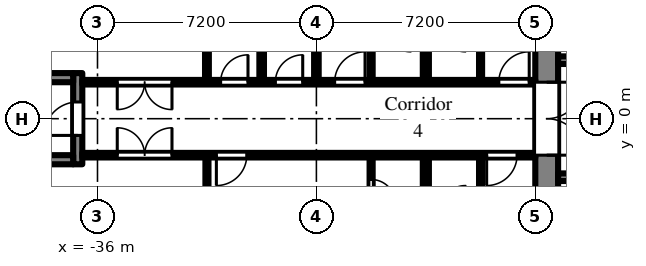
"""IFC4 building model, lengths in metres.
Left out: names, types, materials, properties, quantities, classifications, styles, units other than length and angle.
Written with IfcOpenShell. Run it as: python <this file> out.ifc"""

import sys

from ifc_helpers import new_model, si_unit, direction, frame, frame_2d, origin, place, context, subcontext, project, spatial, rectangle, extrude, element, fill, save


model = new_model("IFC4")
c1 = context("Model", 3, precision=1e-05, world=origin(), true_north=direction((0.0, 1.0)))
c2 = subcontext(c1, "Body", "Model", "MODEL_VIEW")
j1 = project(units=[si_unit("LENGTHUNIT", "METRE"), si_unit("PLANEANGLEUNIT", "RADIAN")], contexts=[c1])
p1 = place(None, origin())
s1 = spatial("IfcSite", under=j1, at=p1, CompositionType="ELEMENT")
p2 = place(p1, origin())
s2 = spatial("IfcBuilding", under=s1, at=p2, CompositionType="ELEMENT")
p3 = place(p2, frame((0.0, 0.0, 44.7)))
s3 = spatial("IfcBuildingStorey", under=s2, at=p3, CompositionType="ELEMENT", Elevation=44.7)
p4 = place(p3, frame((-21.225, -7.2, 0.0), z_axis=(0.0, 0.0, 1.0), x_axis=(0.0, 1.0, 0.0)))
e1 = element("IfcWall", 1, at=p4, inside=s3, PredefinedType="SHEAR", context=c2, shape_type="SweptSolid", body=[
    extrude(rectangle(XDim=14.4, YDim=0.75, at=frame_2d((7.2, 0.0))), origin(), (0.0, 0.0, 1.0), 2.575),
])
p5 = place(p4, frame((6.0, 0.0, 0.0)))
e2 = element("IfcOpeningElement", 2, at=p5, cuts=e1, PredefinedType="OPENING", context=c2, shape_type="SweptSolid", body=[
    extrude(rectangle(XDim=2.4, YDim=2.2, at=frame_2d((1.2, 1.1))), frame((0.0, 0.385, 0.0), z_axis=(0.0, -1.0, 0.0), x_axis=(1.0, 0.0, 0.0)), (0.0, 0.0, 1.0), 0.77),
])
p6 = place(p3, frame((-7.9, 1.925, 0.0), z_axis=(0.0, 0.0, 1.0), x_axis=(-1.0, 0.0, 0.0)))
e3 = element("IfcWall", 3, at=p6, inside=s3, PredefinedType="SHEAR", context=c2, shape_type="SweptSolid", body=[
    extrude(rectangle(XDim=12.95, YDim=0.25, at=frame_2d((6.475, 0.0))), origin(), (0.0, 0.0, 1.0), 2.575),
])
p7 = place(p6, frame((0.525, 0.0, 0.0)))
e4 = element("IfcOpeningElement", 4, at=p7, cuts=e3, PredefinedType="OPENING", context=c2, shape_type="SweptSolid", body=[
    extrude(rectangle(XDim=0.9, YDim=2.1, at=frame_2d((0.45, 1.05))), frame((0.0, 0.135, 0.0), z_axis=(0.0, -1.0, 0.0), x_axis=(1.0, 0.0, 0.0)), (0.0, 0.0, 1.0), 0.27),
])
p8 = place(p6, frame((2.625, 0.0, 0.0)))
e5 = element("IfcOpeningElement", 5, at=p8, cuts=e3, PredefinedType="OPENING", context=c2, shape_type="SweptSolid", body=[
    extrude(rectangle(XDim=1.1, YDim=2.1, at=frame_2d((0.55, 1.05))), frame((0.0, 0.135, 0.0), z_axis=(0.0, -1.0, 0.0), x_axis=(1.0, 0.0, 0.0)), (0.0, 0.0, 1.0), 0.27),
])
p9 = place(p6, frame((4.925, 0.0, 0.0)))
e6 = element("IfcOpeningElement", 6, at=p9, cuts=e3, PredefinedType="OPENING", context=c2, shape_type="SweptSolid", body=[
    extrude(rectangle(XDim=0.9, YDim=2.1, at=frame_2d((0.45, 1.05))), frame((0.0, 0.135, 0.0), z_axis=(0.0, -1.0, 0.0), x_axis=(1.0, 0.0, 0.0)), (0.0, 0.0, 1.0), 0.27),
])
p10 = place(p6, frame((8.225, 0.0, 0.0)))
e7 = element("IfcOpeningElement", 7, at=p10, cuts=e3, PredefinedType="OPENING", context=c2, shape_type="SweptSolid", body=[
    extrude(rectangle(XDim=0.9, YDim=2.1, at=frame_2d((0.45, 1.05))), frame((0.0, 0.135, 0.0), z_axis=(0.0, -1.0, 0.0), x_axis=(1.0, 0.0, 0.0)), (0.0, 0.0, 1.0), 0.27),
])
p11 = place(p3, frame((-7.9, -1.925, 0.0), z_axis=(0.0, 0.0, 1.0), x_axis=(-1.0, 0.0, 0.0)))
e8 = element("IfcWall", 8, at=p11, inside=s3, PredefinedType="SHEAR", context=c2, shape_type="SweptSolid", body=[
    extrude(rectangle(XDim=12.95, YDim=0.25, at=frame_2d((6.475, 0.0))), origin(), (0.0, 0.0, 1.0), 2.575),
])
p12 = place(p11, frame((4.825, 0.0, 0.0)))
e9 = element("IfcOpeningElement", 9, at=p12, cuts=e8, PredefinedType="OPENING", context=c2, shape_type="SweptSolid", body=[
    extrude(rectangle(XDim=1.1, YDim=2.1, at=frame_2d((0.55, 1.05))), frame((0.0, 0.135, 0.0), z_axis=(0.0, -1.0, 0.0), x_axis=(1.0, 0.0, 0.0)), (0.0, 0.0, 1.0), 0.27),
])
p13 = place(p11, frame((7.025, 0.0, 0.0)))
e10 = element("IfcOpeningElement", 10, at=p13, cuts=e8, PredefinedType="OPENING", context=c2, shape_type="SweptSolid", body=[
    extrude(rectangle(XDim=1.1, YDim=2.1, at=frame_2d((0.55, 1.05))), frame((0.0, 0.135, 0.0), z_axis=(0.0, -1.0, 0.0), x_axis=(1.0, 0.0, 0.0)), (0.0, 0.0, 1.0), 0.27),
])
p14 = place(p11, frame((9.225, 0.0, 0.0)))
e11 = element("IfcOpeningElement", 11, at=p14, cuts=e8, PredefinedType="OPENING", context=c2, shape_type="SweptSolid", body=[
    extrude(rectangle(XDim=1.1, YDim=2.1, at=frame_2d((0.55, 1.05))), frame((0.0, 0.135, 0.0), z_axis=(0.0, -1.0, 0.0), x_axis=(1.0, 0.0, 0.0)), (0.0, 0.0, 1.0), 0.27),
])
p15 = place(p11, frame((0.525, 0.0, 0.0)))
e12 = element("IfcOpeningElement", 12, at=p15, cuts=e8, PredefinedType="OPENING", context=c2, shape_type="SweptSolid", body=[
    extrude(rectangle(XDim=0.9, YDim=2.1, at=frame_2d((0.45, 1.05))), frame((0.0, 0.135, 0.0), z_axis=(0.0, -1.0, 0.0), x_axis=(1.0, 0.0, 0.0)), (0.0, 0.0, 1.0), 0.27),
])
p16 = place(p11, frame((2.625, 0.0, 0.0)))
e13 = element("IfcOpeningElement", 13, at=p16, cuts=e8, PredefinedType="OPENING", context=c2, shape_type="SweptSolid", body=[
    extrude(rectangle(XDim=1.1, YDim=2.1, at=frame_2d((0.55, 1.05))), frame((0.0, 0.135, 0.0), z_axis=(0.0, -1.0, 0.0), x_axis=(1.0, 0.0, 0.0)), (0.0, 0.0, 1.0), 0.27),
])
p17 = place(p3, frame((-36.65, -1.5, 0.0), z_axis=(0.0, 0.0, 1.0), x_axis=(0.0, 1.0, 0.0)))
e14 = element("IfcWall", 14, at=p17, inside=s3, PredefinedType="SHEAR", context=c2, shape_type="SweptSolid", body=[
    extrude(rectangle(XDim=3.0, YDim=0.3, at=frame_2d((1.5, 0.0))), origin(), (0.0, 0.0, 1.0), 2.575),
])
p18 = place(p17, frame((0.95, 0.0, 0.0)))
e15 = element("IfcOpeningElement", 15, at=p18, cuts=e14, PredefinedType="OPENING", context=c2, shape_type="SweptSolid", body=[
    extrude(rectangle(XDim=1.1, YDim=2.1, at=frame_2d((0.55, 1.05))), frame((0.0, 0.16, 0.0), z_axis=(0.0, -1.0, 0.0), x_axis=(1.0, 0.0, 0.0)), (0.0, 0.0, 1.0), 0.32),
])
for number, where, z_axis, x_axis in (
    (16, (-36.8, -1.35, 0.0), (0.0, 0.0, 1.0), (-1.0, 0.0, 0.0)),
    (17, (-36.8, 1.35, 0.0), (0.0, 0.0, 1.0), (-1.0, 0.0, 0.0)),
):
    element("IfcWall", number, at=place(p3, frame(where, z_axis=z_axis, x_axis=x_axis)), inside=s3, PredefinedType="SHEAR", context=c2, shape_type="SweptSolid", body=[
        extrude(rectangle(XDim=5.8, YDim=0.3, at=frame_2d((2.9, 0.0))), origin(), (0.0, 0.0, 1.0), 2.575),
    ])
p19 = place(p3, frame((-36.5, -1.2, 0.0), z_axis=(0.0, 0.0, 1.0), x_axis=(1.0, 0.0, 0.0)))
e18 = element("IfcWall", 18, at=p19, inside=s3, PredefinedType="PARTITIONING", context=c2, shape_type="SweptSolid", body=[
    extrude(rectangle(XDim=14.9, YDim=0.15, at=frame_2d((7.45, 0.0))), origin(), (0.0, 0.0, 1.0), 2.575),
])
p20 = place(p19, frame((13.3, 0.0, 0.0)))
e19 = element("IfcOpeningElement", 19, at=p20, cuts=e18, PredefinedType="OPENING", context=c2, shape_type="SweptSolid", body=[
    extrude(rectangle(XDim=1.0, YDim=2.1, at=frame_2d((0.5, 1.05))), frame((0.0, 0.085, 0.0), z_axis=(0.0, -1.0, 0.0), x_axis=(1.0, 0.0, 0.0)), (0.0, 0.0, 1.0), 0.17),
])
p21 = place(p19, frame((4.41, 0.0, 0.0)))
e20 = element("IfcOpeningElement", 20, at=p21, cuts=e18, PredefinedType="OPENING", context=c2, shape_type="SweptSolid", body=[
    extrude(rectangle(XDim=1.0, YDim=2.1, at=frame_2d((0.5, 1.05))), frame((0.0, 0.085, 0.0), z_axis=(0.0, -1.0, 0.0), x_axis=(1.0, 0.0, 0.0)), (0.0, 0.0, 1.0), 0.17),
])
p22 = place(p19, frame((1.15, 0.0, 0.0)))
e21 = element("IfcOpeningElement", 21, at=p22, cuts=e18, PredefinedType="OPENING", context=c2, shape_type="SweptSolid", body=[
    extrude(rectangle(XDim=1.8, YDim=2.1, at=frame_2d((0.9, 1.05))), frame((0.0, 0.085, 0.0), z_axis=(0.0, -1.0, 0.0), x_axis=(1.0, 0.0, 0.0)), (0.0, 0.0, 1.0), 0.17),
])
p23 = place(p3, frame((-36.5, 1.2, 0.0), z_axis=(0.0, 0.0, 1.0), x_axis=(1.0, 0.0, 0.0)))
e22 = element("IfcWall", 22, at=p23, inside=s3, PredefinedType="PARTITIONING", context=c2, shape_type="SweptSolid", body=[
    extrude(rectangle(XDim=14.9, YDim=0.15, at=frame_2d((7.45, 0.0))), origin(), (0.0, 0.0, 1.0), 2.575),
])
p24 = place(p23, frame((13.7, 0.0, 0.0)))
e23 = element("IfcOpeningElement", 23, at=p24, cuts=e22, PredefinedType="OPENING", context=c2, shape_type="SweptSolid", body=[
    extrude(rectangle(XDim=1.0, YDim=2.1, at=frame_2d((0.5, 1.05))), frame((0.0, 0.085, 0.0), z_axis=(0.0, -1.0, 0.0), x_axis=(1.0, 0.0, 0.0)), (0.0, 0.0, 1.0), 0.17),
])
p25 = place(p23, frame((8.3, 0.0, 0.0)))
e24 = element("IfcOpeningElement", 24, at=p25, cuts=e22, PredefinedType="OPENING", context=c2, shape_type="SweptSolid", body=[
    extrude(rectangle(XDim=1.0, YDim=2.1, at=frame_2d((0.5, 1.05))), frame((0.0, 0.085, 0.0), z_axis=(0.0, -1.0, 0.0), x_axis=(1.0, 0.0, 0.0)), (0.0, 0.0, 1.0), 0.17),
])
p26 = place(p23, frame((6.35, 0.0, 0.0)))
e25 = element("IfcOpeningElement", 25, at=p26, cuts=e22, PredefinedType="OPENING", context=c2, shape_type="SweptSolid", body=[
    extrude(rectangle(XDim=0.9, YDim=2.1, at=frame_2d((0.45, 1.05))), frame((0.0, 0.085, 0.0), z_axis=(0.0, -1.0, 0.0), x_axis=(1.0, 0.0, 0.0)), (0.0, 0.0, 1.0), 0.17),
])
p27 = place(p23, frame((4.55, 0.0, 0.0)))
e26 = element("IfcOpeningElement", 26, at=p27, cuts=e22, PredefinedType="OPENING", context=c2, shape_type="SweptSolid", body=[
    extrude(rectangle(XDim=0.9, YDim=2.1, at=frame_2d((0.45, 1.05))), frame((0.0, 0.085, 0.0), z_axis=(0.0, -1.0, 0.0), x_axis=(1.0, 0.0, 0.0)), (0.0, 0.0, 1.0), 0.17),
])
p28 = place(p23, frame((1.15, 0.0, 0.0)))
e27 = element("IfcOpeningElement", 27, at=p28, cuts=e22, PredefinedType="OPENING", context=c2, shape_type="SweptSolid", body=[
    extrude(rectangle(XDim=1.8, YDim=2.1, at=frame_2d((0.9, 1.05))), frame((0.0, 0.085, 0.0), z_axis=(0.0, -1.0, 0.0), x_axis=(1.0, 0.0, 0.0)), (0.0, 0.0, 1.0), 0.17),
])
p29 = place(p3, frame((-32.4, -6.9, 0.0), z_axis=(0.0, 0.0, 1.0), x_axis=(0.0, 1.0, 0.0)))
e28 = element("IfcWall", 28, at=p29, inside=s3, PredefinedType="PARTITIONING", context=c2, shape_type="SweptSolid", body=[
    extrude(rectangle(XDim=5.625, YDim=0.1, at=frame_2d((2.812, 0.0))), origin(), (0.0, 0.0, 1.0), 2.575),
])
p30 = place(p3, frame((-32.4, 1.275, 0.0), z_axis=(0.0, 0.0, 1.0), x_axis=(0.0, 1.0, 0.0)))
e29 = element("IfcWall", 29, at=p30, inside=s3, PredefinedType="PARTITIONING", context=c2, shape_type="SweptSolid", body=[
    extrude(rectangle(XDim=5.625, YDim=0.125, at=frame_2d((2.812, 0.0))), origin(), (0.0, 0.0, 1.0), 2.575),
])
for number, where, z_axis, x_axis in (
    (30, (-30.6, 1.275, 0.0), (0.0, 0.0, 1.0), (0.0, 1.0, 0.0)),
    (31, (-28.8, 1.275, 0.0), (0.0, 0.0, 1.0), (0.0, 1.0, 0.0)),
):
    element("IfcWall", number, at=place(p3, frame(where, z_axis=z_axis, x_axis=x_axis)), inside=s3, PredefinedType="PARTITIONING", context=c2, shape_type="SweptSolid", body=[
        extrude(rectangle(XDim=5.625, YDim=0.15, at=frame_2d((2.812, 0.0))), origin(), (0.0, 0.0, 1.0), 2.575),
    ])
p31 = place(p3, frame((-27.0, -3.65, 0.0), z_axis=(0.0, 0.0, 1.0), x_axis=(0.0, 1.0, 0.0)))
e32 = element("IfcWall", 32, at=p31, inside=s3, PredefinedType="PARTITIONING", context=c2, shape_type="SweptSolid", body=[
    extrude(rectangle(XDim=2.375, YDim=0.1, at=frame_2d((1.188, 0.0))), origin(), (0.0, 0.0, 1.0), 2.575),
])
p32 = place(p31, frame((0.85, 0.0, 0.0)))
e33 = element("IfcOpeningElement", 33, at=p32, cuts=e32, PredefinedType="OPENING", context=c2, shape_type="SweptSolid", body=[
    extrude(rectangle(XDim=0.8, YDim=2.1, at=frame_2d((0.4, 1.05))), frame((0.0, 0.06, 0.0), z_axis=(0.0, -1.0, 0.0), x_axis=(1.0, 0.0, 0.0)), (0.0, 0.0, 1.0), 0.12),
])
p33 = place(p3, frame((-27.0, 1.275, 0.0), z_axis=(0.0, 0.0, 1.0), x_axis=(0.0, 1.0, 0.0)))
e34 = element("IfcWall", 34, at=p33, inside=s3, PredefinedType="PARTITIONING", context=c2, shape_type="SweptSolid", body=[
    extrude(rectangle(XDim=1.675, YDim=0.1, at=frame_2d((0.837, 0.0))), origin(), (0.0, 0.0, 1.0), 2.575),
])
for number, where, z_axis, x_axis in (
    (35, (-25.2, -6.9, 0.0), (0.0, 0.0, 1.0), (0.0, 1.0, 0.0)),
    (36, (-25.2, 1.275, 0.0), (0.0, 0.0, 1.0), (0.0, 1.0, 0.0)),
):
    element("IfcWall", number, at=place(p3, frame(where, z_axis=z_axis, x_axis=x_axis)), inside=s3, PredefinedType="PARTITIONING", context=c2, shape_type="SweptSolid", body=[
        extrude(rectangle(XDim=5.625, YDim=0.2, at=frame_2d((2.812, 0.0))), origin(), (0.0, 0.0, 1.0), 2.575),
    ])
for number, where, z_axis, x_axis in (
    (37, (-23.4, -2.95, 0.0), (0.0, 0.0, 1.0), (0.0, 1.0, 0.0)),
    (38, (-23.4, 1.275, 0.0), (0.0, 0.0, 1.0), (0.0, 1.0, 0.0)),
):
    element("IfcWall", number, at=place(p3, frame(where, z_axis=z_axis, x_axis=x_axis)), inside=s3, PredefinedType="PARTITIONING", context=c2, shape_type="SweptSolid", body=[
        extrude(rectangle(XDim=1.675, YDim=0.1, at=frame_2d((0.837, 0.0))), origin(), (0.0, 0.0, 1.0), 2.575),
    ])
p34 = place(p5, frame((2.4, 0.0, 0.0), z_axis=(0.0, 0.0, 1.0), x_axis=(-1.0, 0.0, 0.0)))
e39 = element("IfcDoor", 39, at=p34, inside=s3, OperationType="DOUBLE_DOOR_DOUBLE_SWING", PredefinedType="DOOR", context=c2, shape_type="SweptSolid", body=[
    extrude(rectangle(XDim=2.4, YDim=2.2, at=frame_2d((1.2, 1.1))), frame((0.0, 0.025, 0.0), z_axis=(0.0, -1.0, 0.0), x_axis=(1.0, 0.0, 0.0)), (0.0, 0.0, 1.0), 0.05),
])
fill(e2, e39)
p35 = place(p18, origin())
e40 = element("IfcDoor", 40, at=p35, inside=s3, OperationType="SINGLE_SWING_LEFT", PredefinedType="DOOR", context=c2, shape_type="SweptSolid", body=[
    extrude(rectangle(XDim=1.1, YDim=2.1, at=frame_2d((0.55, 1.05))), frame((0.0, 0.025, 0.0), z_axis=(0.0, -1.0, 0.0), x_axis=(1.0, 0.0, 0.0)), (0.0, 0.0, 1.0), 0.05),
])
fill(e15, e40)
p36 = place(p20, frame((1.0, 0.0, 0.0), z_axis=(0.0, 0.0, 1.0), x_axis=(-1.0, 0.0, 0.0)))
e41 = element("IfcDoor", 41, at=p36, inside=s3, OperationType="SINGLE_SWING_RIGHT", PredefinedType="DOOR", context=c2, shape_type="SweptSolid", body=[
    extrude(rectangle(XDim=1.0, YDim=2.1, at=frame_2d((0.5, 1.05))), frame((0.0, 0.025, 0.0), z_axis=(0.0, -1.0, 0.0), x_axis=(1.0, 0.0, 0.0)), (0.0, 0.0, 1.0), 0.05),
])
fill(e19, e41)
p37 = place(p32, frame((0.8, 0.0, 0.0), z_axis=(0.0, 0.0, 1.0), x_axis=(-1.0, 0.0, 0.0)))
e42 = element("IfcDoor", 42, at=p37, inside=s3, OperationType="SINGLE_SWING_RIGHT", PredefinedType="DOOR", context=c2, shape_type="SweptSolid", body=[
    extrude(rectangle(XDim=0.8, YDim=2.1, at=frame_2d((0.4, 1.05))), frame((0.0, 0.025, 0.0), z_axis=(0.0, -1.0, 0.0), x_axis=(1.0, 0.0, 0.0)), (0.0, 0.0, 1.0), 0.05),
])
fill(e33, e42)
p38 = place(p21, frame((1.0, 0.0, 0.0), z_axis=(0.0, 0.0, 1.0), x_axis=(-1.0, 0.0, 0.0)))
e43 = element("IfcDoor", 43, at=p38, inside=s3, OperationType="SINGLE_SWING_RIGHT", PredefinedType="DOOR", context=c2, shape_type="SweptSolid", body=[
    extrude(rectangle(XDim=1.0, YDim=2.1, at=frame_2d((0.5, 1.05))), frame((0.0, 0.025, 0.0), z_axis=(0.0, -1.0, 0.0), x_axis=(1.0, 0.0, 0.0)), (0.0, 0.0, 1.0), 0.05),
])
fill(e20, e43)
p39 = place(p22, origin())
e44 = element("IfcDoor", 44, at=p39, inside=s3, OperationType="DOUBLE_DOOR_DOUBLE_SWING", PredefinedType="DOOR", context=c2, shape_type="SweptSolid", body=[
    extrude(rectangle(XDim=1.8, YDim=2.1, at=frame_2d((0.9, 1.05))), frame((0.0, 0.025, 0.0), z_axis=(0.0, -1.0, 0.0), x_axis=(1.0, 0.0, 0.0)), (0.0, 0.0, 1.0), 0.05),
])
fill(e21, e44)
p40 = place(p24, origin())
e45 = element("IfcDoor", 45, at=p40, inside=s3, OperationType="SINGLE_SWING_RIGHT", PredefinedType="DOOR", context=c2, shape_type="SweptSolid", body=[
    extrude(rectangle(XDim=1.0, YDim=2.1, at=frame_2d((0.5, 1.05))), frame((0.0, 0.025, 0.0), z_axis=(0.0, -1.0, 0.0), x_axis=(1.0, 0.0, 0.0)), (0.0, 0.0, 1.0), 0.05),
])
fill(e23, e45)
p41 = place(p25, origin())
e46 = element("IfcDoor", 46, at=p41, inside=s3, OperationType="SINGLE_SWING_RIGHT", PredefinedType="DOOR", context=c2, shape_type="SweptSolid", body=[
    extrude(rectangle(XDim=1.0, YDim=2.1, at=frame_2d((0.5, 1.05))), frame((0.0, 0.025, 0.0), z_axis=(0.0, -1.0, 0.0), x_axis=(1.0, 0.0, 0.0)), (0.0, 0.0, 1.0), 0.05),
])
fill(e24, e46)
p42 = place(p26, origin())
e47 = element("IfcDoor", 47, at=p42, inside=s3, OperationType="SINGLE_SWING_RIGHT", PredefinedType="DOOR", context=c2, shape_type="SweptSolid", body=[
    extrude(rectangle(XDim=0.9, YDim=2.1, at=frame_2d((0.45, 1.05))), frame((0.0, 0.025, 0.0), z_axis=(0.0, -1.0, 0.0), x_axis=(1.0, 0.0, 0.0)), (0.0, 0.0, 1.0), 0.05),
])
fill(e25, e47)
p43 = place(p27, origin())
e48 = element("IfcDoor", 48, at=p43, inside=s3, OperationType="SINGLE_SWING_RIGHT", PredefinedType="DOOR", context=c2, shape_type="SweptSolid", body=[
    extrude(rectangle(XDim=0.9, YDim=2.1, at=frame_2d((0.45, 1.05))), frame((0.0, 0.025, 0.0), z_axis=(0.0, -1.0, 0.0), x_axis=(1.0, 0.0, 0.0)), (0.0, 0.0, 1.0), 0.05),
])
fill(e26, e48)
p44 = place(p28, frame((1.8, 0.0, 0.0), z_axis=(0.0, 0.0, 1.0), x_axis=(-1.0, 0.0, 0.0)))
e49 = element("IfcDoor", 49, at=p44, inside=s3, OperationType="DOUBLE_DOOR_DOUBLE_SWING", PredefinedType="DOOR", context=c2, shape_type="SweptSolid", body=[
    extrude(rectangle(XDim=1.8, YDim=2.1, at=frame_2d((0.9, 1.05))), frame((0.0, 0.025, 0.0), z_axis=(0.0, -1.0, 0.0), x_axis=(1.0, 0.0, 0.0)), (0.0, 0.0, 1.0), 0.05),
])
fill(e27, e49)
save(model, sys.argv[1])
